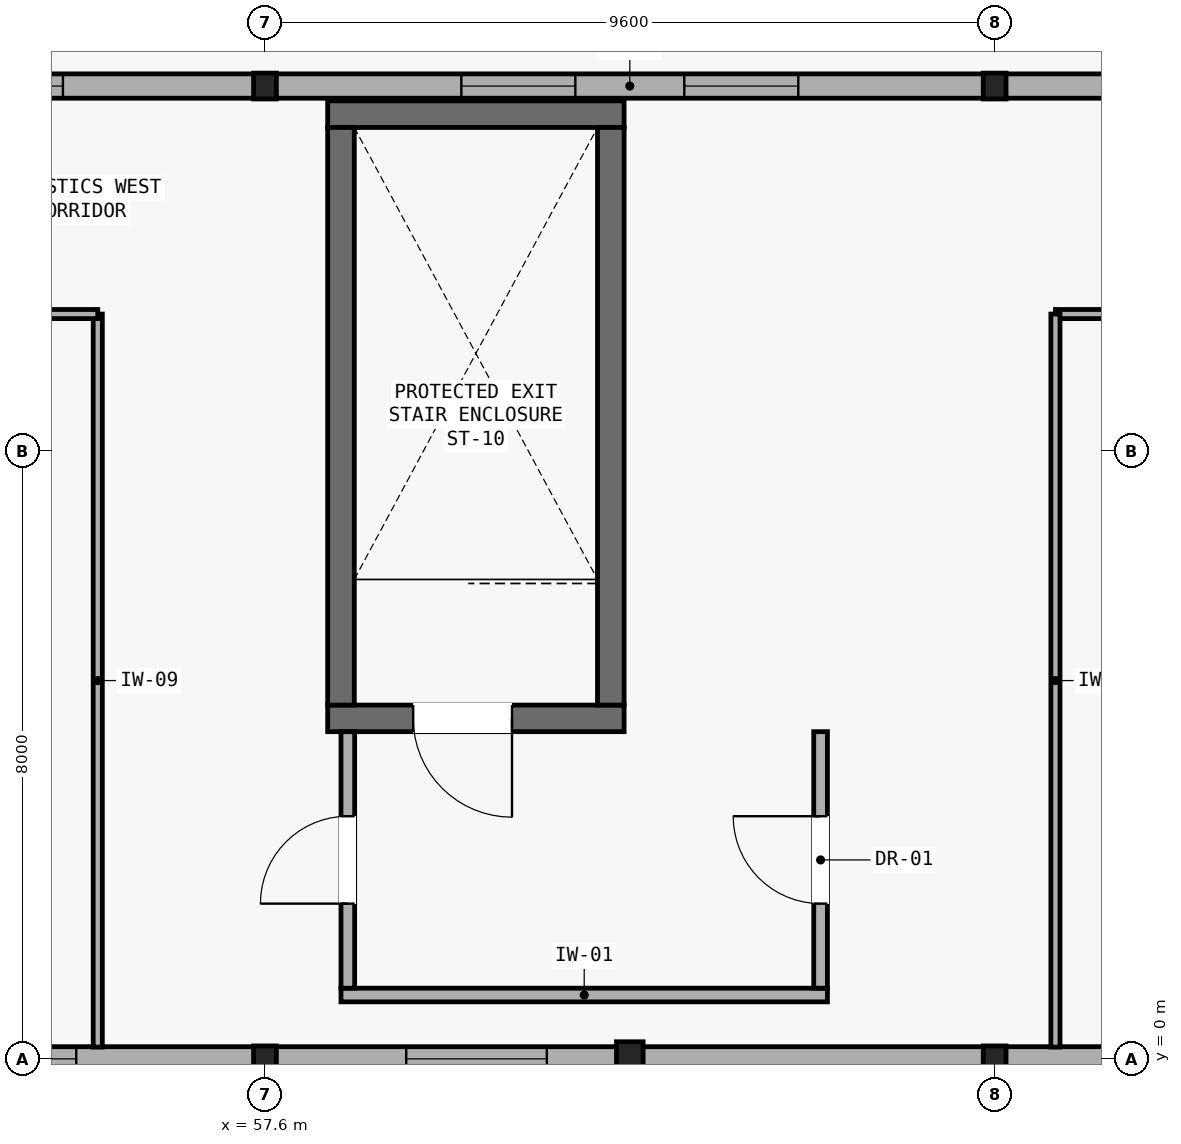
"""IFC4 building model, lengths in metres.
Left out: names, types, materials, properties, quantities, classifications, styles, units other than length and angle.
Written with IfcOpenShell. Run it as: python <this file> out.ifc"""

import sys

from ifc_helpers import new_model, si_unit, direction, frame, frame_2d, origin, origin_2d, place, context, subcontext, project, spatial, rectangle, i_section, extrude, element, fill, save


model = new_model("IFC4")
c1 = context("Model", 3, precision=1e-05, world=origin(), true_north=direction((0.0, 1.0)))
c2 = subcontext(c1, "Body", "Model", "MODEL_VIEW")
j1 = project(units=[si_unit("LENGTHUNIT", "METRE"), si_unit("PLANEANGLEUNIT", "RADIAN")], contexts=[c1])
p1 = place(None, origin())
s1 = spatial("IfcSite", under=j1, at=p1, CompositionType="ELEMENT")
p2 = place(p1, origin())
s2 = spatial("IfcBuilding", under=s1, at=p2, CompositionType="ELEMENT")
p3 = place(p2, frame((0.0, 0.0, 5.25)))
s3 = spatial("IfcBuildingStorey", under=s2, at=p3, CompositionType="ELEMENT", Elevation=5.25)
for number, where, z_axis, x_axis in (
    (1, (57.6, 0.0, 0.0), (0.0, 0.0, 1.0), (1.0, 0.0, 0.0)),
    (2, (57.6, 12.8, 0.0), (0.0, 0.0, 1.0), (1.0, 0.0, 0.0)),
    (3, (67.2, 0.0, 0.0), (0.0, 0.0, 1.0), (1.0, 0.0, 0.0)),
    (4, (67.2, 12.8, 0.0), (0.0, 0.0, 1.0), (1.0, 0.0, 0.0)),
):
    element("IfcColumn", number, at=place(p3, frame(where, z_axis=z_axis, x_axis=x_axis)), inside=s3, PredefinedType="COLUMN", context=c2, shape_type="SweptSolid", body=[
        extrude(i_section(OverallWidth=0.3, OverallDepth=0.34, WebThickness=0.012, FlangeThickness=0.021, FilletRadius=0.027, at=origin_2d()), origin(), (0.0, 0.0, 1.0), 4.2),
    ])
p4 = place(p3, frame((62.4, 0.0, 0.0), z_axis=(0.0, 0.0, 1.0), x_axis=(1.0, 0.0, 0.0)))
e5 = element("IfcColumn", 5, at=p4, inside=s3, PredefinedType="PILASTER", context=c2, shape_type="SweptSolid", body=[
    extrude(rectangle(XDim=0.35, YDim=0.45, at=origin_2d()), origin(), (0.0, 0.0, 1.0), 3.95),
])
p5 = place(p3, frame((48.008, 0.0, 0.0), z_axis=(0.0, 0.0, 1.0), x_axis=(1.0, 0.0, 0.0)))
e6 = element("IfcWall", 6, at=p5, inside=s3, PredefinedType="SOLIDWALL", context=c2, shape_type="SweptSolid", body=[
    extrude(rectangle(XDim=9.584, YDim=0.32, at=frame_2d((4.792, 0.0))), origin(), (0.0, 0.0, 1.0), 3.635),
])
p6 = place(p5, frame((2.475, 0.0, 0.9)))
e7 = element("IfcOpeningElement", 7, at=p6, cuts=e6, PredefinedType="OPENING", context=c2, shape_type="SweptSolid", body=[
    extrude(rectangle(XDim=1.7, YDim=1.3, at=frame_2d((0.85, 0.65))), frame((0.0, 0.17, 0.0), z_axis=(0.0, -1.0, 0.0), x_axis=(1.0, 0.0, 0.0)), (0.0, 0.0, 1.0), 0.34),
])
p7 = place(p5, frame((5.409, 0.0, 0.9)))
e8 = element("IfcOpeningElement", 8, at=p7, cuts=e6, PredefinedType="OPENING", context=c2, shape_type="SweptSolid", body=[
    extrude(rectangle(XDim=1.7, YDim=1.3, at=frame_2d((0.85, 0.65))), frame((0.0, 0.17, 0.0), z_axis=(0.0, -1.0, 0.0), x_axis=(1.0, 0.0, 0.0)), (0.0, 0.0, 1.0), 0.34),
])
p8 = place(p3, frame((57.608, 0.0, 0.0), z_axis=(0.0, 0.0, 1.0), x_axis=(1.0, 0.0, 0.0)))
e9 = element("IfcWall", 9, at=p8, inside=s3, PredefinedType="SOLIDWALL", context=c2, shape_type="SweptSolid", body=[
    extrude(rectangle(XDim=9.584, YDim=0.32, at=frame_2d((4.792, 0.0))), origin(), (0.0, 0.0, 1.0), 3.635),
])
p9 = place(p8, frame((1.85, 0.0, 0.9)))
e10 = element("IfcOpeningElement", 10, at=p9, cuts=e9, PredefinedType="OPENING", context=c2, shape_type="SweptSolid", body=[
    extrude(rectangle(XDim=1.85, YDim=1.3, at=frame_2d((0.925, 0.65))), frame((0.0, 0.17, 0.0), z_axis=(0.0, -1.0, 0.0), x_axis=(1.0, 0.0, 0.0)), (0.0, 0.0, 1.0), 0.34),
])
p10 = place(p3, frame((67.208, 0.0, 0.0), z_axis=(0.0, 0.0, 1.0), x_axis=(1.0, 0.0, 0.0)))
e11 = element("IfcWall", 11, at=p10, inside=s3, PredefinedType="SOLIDWALL", context=c2, shape_type="SweptSolid", body=[
    extrude(rectangle(XDim=9.584, YDim=0.32, at=frame_2d((4.792, 0.0))), origin(), (0.0, 0.0, 1.0), 3.635),
])
p11 = place(p10, frame((2.325, 0.0, 0.9)))
e12 = element("IfcOpeningElement", 12, at=p11, cuts=e11, PredefinedType="OPENING", context=c2, shape_type="SweptSolid", body=[
    extrude(rectangle(XDim=2.0, YDim=1.3, at=frame_2d((1.0, 0.65))), frame((0.0, 0.17, 0.0), z_axis=(0.0, -1.0, 0.0), x_axis=(1.0, 0.0, 0.0)), (0.0, 0.0, 1.0), 0.34),
])
p12 = place(p10, frame((5.259, 0.0, 0.9)))
e13 = element("IfcOpeningElement", 13, at=p12, cuts=e11, PredefinedType="OPENING", context=c2, shape_type="SweptSolid", body=[
    extrude(rectangle(XDim=2.0, YDim=1.3, at=frame_2d((1.0, 0.65))), frame((0.0, 0.17, 0.0), z_axis=(0.0, -1.0, 0.0), x_axis=(1.0, 0.0, 0.0)), (0.0, 0.0, 1.0), 0.34),
])
p13 = place(p3, frame((48.008, 12.8, 0.0), z_axis=(0.0, 0.0, 1.0), x_axis=(1.0, 0.0, 0.0)))
e14 = element("IfcWall", 14, at=p13, inside=s3, PredefinedType="SOLIDWALL", context=c2, shape_type="SweptSolid", body=[
    extrude(rectangle(XDim=9.584, YDim=0.32, at=frame_2d((4.792, 0.0))), origin(), (0.0, 0.0, 1.0), 3.635),
])
p14 = place(p13, frame((2.65, 0.0, 0.9)))
e15 = element("IfcOpeningElement", 15, at=p14, cuts=e14, PredefinedType="OPENING", context=c2, shape_type="SweptSolid", body=[
    extrude(rectangle(XDim=1.35, YDim=1.55, at=frame_2d((0.675, 0.775))), frame((0.0, 0.17, 0.0), z_axis=(0.0, -1.0, 0.0), x_axis=(1.0, 0.0, 0.0)), (0.0, 0.0, 1.0), 0.34),
])
p15 = place(p13, frame((5.584, 0.0, 0.9)))
e16 = element("IfcOpeningElement", 16, at=p15, cuts=e14, PredefinedType="OPENING", context=c2, shape_type="SweptSolid", body=[
    extrude(rectangle(XDim=1.35, YDim=1.55, at=frame_2d((0.675, 0.775))), frame((0.0, 0.17, 0.0), z_axis=(0.0, -1.0, 0.0), x_axis=(1.0, 0.0, 0.0)), (0.0, 0.0, 1.0), 0.34),
])
p16 = place(p3, frame((57.608, 12.8, 0.0), z_axis=(0.0, 0.0, 1.0), x_axis=(1.0, 0.0, 0.0)))
e17 = element("IfcWall", 17, at=p16, inside=s3, PredefinedType="SOLIDWALL", context=c2, shape_type="SweptSolid", body=[
    extrude(rectangle(XDim=9.584, YDim=0.32, at=frame_2d((4.792, 0.0))), origin(), (0.0, 0.0, 1.0), 3.635),
])
p17 = place(p16, frame((2.575, 0.0, 0.9)))
e18 = element("IfcOpeningElement", 18, at=p17, cuts=e17, PredefinedType="OPENING", context=c2, shape_type="SweptSolid", body=[
    extrude(rectangle(XDim=1.5, YDim=1.55, at=frame_2d((0.75, 0.775))), frame((0.0, 0.17, 0.0), z_axis=(0.0, -1.0, 0.0), x_axis=(1.0, 0.0, 0.0)), (0.0, 0.0, 1.0), 0.34),
])
p18 = place(p16, frame((5.509, 0.0, 0.9)))
e19 = element("IfcOpeningElement", 19, at=p18, cuts=e17, PredefinedType="OPENING", context=c2, shape_type="SweptSolid", body=[
    extrude(rectangle(XDim=1.5, YDim=1.55, at=frame_2d((0.75, 0.775))), frame((0.0, 0.17, 0.0), z_axis=(0.0, -1.0, 0.0), x_axis=(1.0, 0.0, 0.0)), (0.0, 0.0, 1.0), 0.34),
])
p19 = place(p3, frame((67.208, 12.8, 0.0), z_axis=(0.0, 0.0, 1.0), x_axis=(1.0, 0.0, 0.0)))
e20 = element("IfcWall", 20, at=p19, inside=s3, PredefinedType="SOLIDWALL", context=c2, shape_type="SweptSolid", body=[
    extrude(rectangle(XDim=9.584, YDim=0.32, at=frame_2d((4.792, 0.0))), origin(), (0.0, 0.0, 1.0), 3.635),
])
p20 = place(p19, frame((2.5, 0.0, 0.9)))
e21 = element("IfcOpeningElement", 21, at=p20, cuts=e20, PredefinedType="OPENING", context=c2, shape_type="SweptSolid", body=[
    extrude(rectangle(XDim=1.65, YDim=1.55, at=frame_2d((0.825, 0.775))), frame((0.0, 0.17, 0.0), z_axis=(0.0, -1.0, 0.0), x_axis=(1.0, 0.0, 0.0)), (0.0, 0.0, 1.0), 0.34),
])
p21 = place(p19, frame((5.434, 0.0, 0.9)))
e22 = element("IfcOpeningElement", 22, at=p21, cuts=e20, PredefinedType="OPENING", context=c2, shape_type="SweptSolid", body=[
    extrude(rectangle(XDim=1.65, YDim=1.55, at=frame_2d((0.825, 0.775))), frame((0.0, 0.17, 0.0), z_axis=(0.0, -1.0, 0.0), x_axis=(1.0, 0.0, 0.0)), (0.0, 0.0, 1.0), 0.34),
])
p22 = place(p3, frame((58.425, 4.48, 0.0), z_axis=(0.0, 0.0, 1.0), x_axis=(1.0, 0.0, 0.0)))
e23 = element("IfcWall", 23, at=p22, inside=s3, PredefinedType="SHEAR", context=c2, shape_type="SweptSolid", body=[
    extrude(rectangle(XDim=3.9, YDim=0.35, at=frame_2d((1.95, 0.0))), origin(), (0.0, 0.0, 1.0), 3.96),
])
p23 = place(p22, frame((1.125, 0.0, 0.0)))
e24 = element("IfcOpeningElement", 24, at=p23, cuts=e23, PredefinedType="OPENING", context=c2, shape_type="SweptSolid", body=[
    extrude(rectangle(XDim=1.3, YDim=2.15, at=frame_2d((0.65, 1.075))), frame((0.0, 0.185, 0.0), z_axis=(0.0, -1.0, 0.0), x_axis=(1.0, 0.0, 0.0)), (0.0, 0.0, 1.0), 0.37),
])
p24 = place(p3, frame((58.425, 12.43, 0.0), z_axis=(0.0, 0.0, 1.0), x_axis=(1.0, 0.0, 0.0)))
e25 = element("IfcWall", 25, at=p24, inside=s3, PredefinedType="SHEAR", context=c2, shape_type="SweptSolid", body=[
    extrude(rectangle(XDim=3.9, YDim=0.35, at=frame_2d((1.95, 0.0))), origin(), (0.0, 0.0, 1.0), 3.96),
])
for number, where, z_axis, x_axis in (
    (26, (58.6, 4.655, 0.0), (0.0, 0.0, 1.0), (0.0, 1.0, 0.0)),
    (27, (62.15, 4.655, 0.0), (0.0, 0.0, 1.0), (0.0, 1.0, 0.0)),
):
    element("IfcWall", number, at=place(p3, frame(where, z_axis=z_axis, x_axis=x_axis)), inside=s3, PredefinedType="SHEAR", context=c2, shape_type="SweptSolid", body=[
        extrude(rectangle(XDim=7.6, YDim=0.35, at=frame_2d((3.8, 0.0))), origin(), (0.0, 0.0, 1.0), 3.96),
    ])
p25 = place(p3, frame((58.6, 0.84, 0.0), z_axis=(0.0, 0.0, 1.0), x_axis=(1.0, 0.0, 0.0)))
e28 = element("IfcWall", 28, at=p25, inside=s3, PredefinedType="PARTITIONING", context=c2, shape_type="SweptSolid", body=[
    extrude(rectangle(XDim=6.4, YDim=0.18, at=frame_2d((3.2, 0.0))), origin(), (0.0, 0.0, 1.0), 3.96),
])
p26 = place(p3, frame((58.69, 0.93, 0.0), z_axis=(0.0, 0.0, 1.0), x_axis=(0.0, 1.0, 0.0)))
e29 = element("IfcWall", 29, at=p26, inside=s3, PredefinedType="PARTITIONING", context=c2, shape_type="SweptSolid", body=[
    extrude(rectangle(XDim=3.375, YDim=0.18, at=frame_2d((1.688, 0.0))), origin(), (0.0, 0.0, 1.0), 3.96),
])
p27 = place(p26, frame((1.113, 0.0, 0.0)))
e30 = element("IfcOpeningElement", 30, at=p27, cuts=e29, PredefinedType="OPENING", context=c2, shape_type="SweptSolid", body=[
    extrude(rectangle(XDim=1.15, YDim=2.15, at=frame_2d((0.575, 1.075))), frame((0.0, 0.1, 0.0), z_axis=(0.0, -1.0, 0.0), x_axis=(1.0, 0.0, 0.0)), (0.0, 0.0, 1.0), 0.2),
])
p28 = place(p3, frame((64.91, 0.93, 0.0), z_axis=(0.0, 0.0, 1.0), x_axis=(0.0, 1.0, 0.0)))
e31 = element("IfcWall", 31, at=p28, inside=s3, PredefinedType="PARTITIONING", context=c2, shape_type="SweptSolid", body=[
    extrude(rectangle(XDim=3.375, YDim=0.18, at=frame_2d((1.688, 0.0))), origin(), (0.0, 0.0, 1.0), 3.96),
])
p29 = place(p28, frame((1.113, 0.0, 0.0)))
e32 = element("IfcOpeningElement", 32, at=p29, cuts=e31, PredefinedType="OPENING", context=c2, shape_type="SweptSolid", body=[
    extrude(rectangle(XDim=1.15, YDim=2.15, at=frame_2d((0.575, 1.075))), frame((0.0, 0.1, 0.0), z_axis=(0.0, -1.0, 0.0), x_axis=(1.0, 0.0, 0.0)), (0.0, 0.0, 1.0), 0.2),
])
p30 = place(p3, frame((55.4, 0.155, 0.0), z_axis=(0.0, 0.0, 1.0), x_axis=(0.0, 1.0, 0.0)))
e33 = element("IfcWall", 33, at=p30, inside=s3, PredefinedType="PARTITIONING", context=c2, shape_type="SweptSolid", body=[
    extrude(rectangle(XDim=9.645, YDim=0.12, at=frame_2d((4.823, 0.0))), origin(), (0.0, 0.0, 1.0), 3.96),
])
p31 = place(p3, frame((55.4, 9.8, 0.0), z_axis=(0.0, 0.0, 1.0), x_axis=(-1.0, 0.0, 0.0)))
e34 = element("IfcWall", 34, at=p31, inside=s3, PredefinedType="PARTITIONING", context=c2, shape_type="SweptSolid", body=[
    extrude(rectangle(XDim=55.245, YDim=0.12, at=frame_2d((27.623, 0.0))), origin(), (0.0, 0.0, 1.0), 3.96),
])
p32 = place(p31, frame((27.113, 0.0, 0.0)))
e35 = element("IfcOpeningElement", 35, at=p32, cuts=e34, PredefinedType="OPENING", context=c2, shape_type="SweptSolid", body=[
    extrude(rectangle(XDim=1.02, YDim=2.1, at=frame_2d((0.51, 1.05))), frame((0.0, 0.07, 0.0), z_axis=(0.0, -1.0, 0.0), x_axis=(1.0, 0.0, 0.0)), (0.0, 0.0, 1.0), 0.14),
])
p33 = place(p3, frame((125.045, 9.8, 0.0), z_axis=(0.0, 0.0, 1.0), x_axis=(-1.0, 0.0, 0.0)))
e36 = element("IfcWall", 36, at=p33, inside=s3, PredefinedType="PARTITIONING", context=c2, shape_type="SweptSolid", body=[
    extrude(rectangle(XDim=57.045, YDim=0.12, at=frame_2d((28.522, 0.0))), origin(), (0.0, 0.0, 1.0), 3.96),
])
p34 = place(p33, frame((28.032, 0.0, 0.0)))
e37 = element("IfcOpeningElement", 37, at=p34, cuts=e36, PredefinedType="OPENING", context=c2, shape_type="SweptSolid", body=[
    extrude(rectangle(XDim=0.98, YDim=2.1, at=frame_2d((0.49, 1.05))), frame((0.0, 0.07, 0.0), z_axis=(0.0, -1.0, 0.0), x_axis=(1.0, 0.0, 0.0)), (0.0, 0.0, 1.0), 0.14),
])
p35 = place(p3, frame((68.0, 9.8, 0.0), z_axis=(0.0, 0.0, 1.0), x_axis=(0.0, -1.0, 0.0)))
e38 = element("IfcWall", 38, at=p35, inside=s3, PredefinedType="PARTITIONING", context=c2, shape_type="SweptSolid", body=[
    extrude(rectangle(XDim=9.645, YDim=0.12, at=frame_2d((4.823, 0.0))), origin(), (0.0, 0.0, 1.0), 3.96),
])
p36 = place(p7, origin())
e39 = element("IfcWindow", 39, at=p36, inside=s3, PartitioningType="SINGLE_PANEL", PredefinedType="WINDOW", context=c2, shape_type="SweptSolid", body=[
    extrude(rectangle(XDim=1.7, YDim=1.3, at=frame_2d((0.85, 0.65))), frame((0.0, 0.03, 0.0), z_axis=(0.0, -1.0, 0.0), x_axis=(1.0, 0.0, 0.0)), (0.0, 0.0, 1.0), 0.06),
])
fill(e8, e39)
p37 = place(p9, origin())
e40 = element("IfcWindow", 40, at=p37, inside=s3, PartitioningType="SINGLE_PANEL", PredefinedType="WINDOW", context=c2, shape_type="SweptSolid", body=[
    extrude(rectangle(XDim=1.85, YDim=1.3, at=frame_2d((0.925, 0.65))), frame((0.0, 0.03, 0.0), z_axis=(0.0, -1.0, 0.0), x_axis=(1.0, 0.0, 0.0)), (0.0, 0.0, 1.0), 0.06),
])
fill(e10, e40)
p38 = place(p15, origin())
e41 = element("IfcWindow", 41, at=p38, inside=s3, PartitioningType="SINGLE_PANEL", PredefinedType="WINDOW", context=c2, shape_type="SweptSolid", body=[
    extrude(rectangle(XDim=1.35, YDim=1.55, at=frame_2d((0.675, 0.775))), frame((0.0, 0.03, 0.0), z_axis=(0.0, -1.0, 0.0), x_axis=(1.0, 0.0, 0.0)), (0.0, 0.0, 1.0), 0.06),
])
fill(e16, e41)
p39 = place(p17, origin())
e42 = element("IfcWindow", 42, at=p39, inside=s3, PartitioningType="SINGLE_PANEL", PredefinedType="WINDOW", context=c2, shape_type="SweptSolid", body=[
    extrude(rectangle(XDim=1.5, YDim=1.55, at=frame_2d((0.75, 0.775))), frame((0.0, 0.03, 0.0), z_axis=(0.0, -1.0, 0.0), x_axis=(1.0, 0.0, 0.0)), (0.0, 0.0, 1.0), 0.06),
])
fill(e18, e42)
p40 = place(p18, origin())
e43 = element("IfcWindow", 43, at=p40, inside=s3, PartitioningType="SINGLE_PANEL", PredefinedType="WINDOW", context=c2, shape_type="SweptSolid", body=[
    extrude(rectangle(XDim=1.5, YDim=1.55, at=frame_2d((0.75, 0.775))), frame((0.0, 0.03, 0.0), z_axis=(0.0, -1.0, 0.0), x_axis=(1.0, 0.0, 0.0)), (0.0, 0.0, 1.0), 0.06),
])
fill(e19, e43)
p41 = place(p23, frame((1.3, 0.0, 0.0), z_axis=(0.0, 0.0, 1.0), x_axis=(-1.0, 0.0, 0.0)))
e44 = element("IfcDoor", 44, at=p41, inside=s3, OperationType="SINGLE_SWING_RIGHT", PredefinedType="DOOR", context=c2, shape_type="SweptSolid", body=[
    extrude(rectangle(XDim=1.3, YDim=2.15, at=frame_2d((0.65, 1.075))), frame((0.0, 0.025, 0.0), z_axis=(0.0, -1.0, 0.0), x_axis=(1.0, 0.0, 0.0)), (0.0, 0.0, 1.0), 0.05),
])
fill(e24, e44)
p42 = place(p27, origin())
e45 = element("IfcDoor", 45, at=p42, inside=s3, OperationType="SINGLE_SWING_LEFT", PredefinedType="DOOR", context=c2, shape_type="SweptSolid", body=[
    extrude(rectangle(XDim=1.15, YDim=2.15, at=frame_2d((0.575, 1.075))), frame((0.0, 0.025, 0.0), z_axis=(0.0, -1.0, 0.0), x_axis=(1.0, 0.0, 0.0)), (0.0, 0.0, 1.0), 0.05),
])
fill(e30, e45)
p43 = place(p29, origin())
e46 = element("IfcDoor", 46, at=p43, inside=s3, OperationType="SINGLE_SWING_RIGHT", PredefinedType="DOOR", context=c2, shape_type="SweptSolid", body=[
    extrude(rectangle(XDim=1.15, YDim=2.15, at=frame_2d((0.575, 1.075))), frame((0.0, 0.025, 0.0), z_axis=(0.0, -1.0, 0.0), x_axis=(1.0, 0.0, 0.0)), (0.0, 0.0, 1.0), 0.05),
])
fill(e32, e46)
save(model, sys.argv[1])
